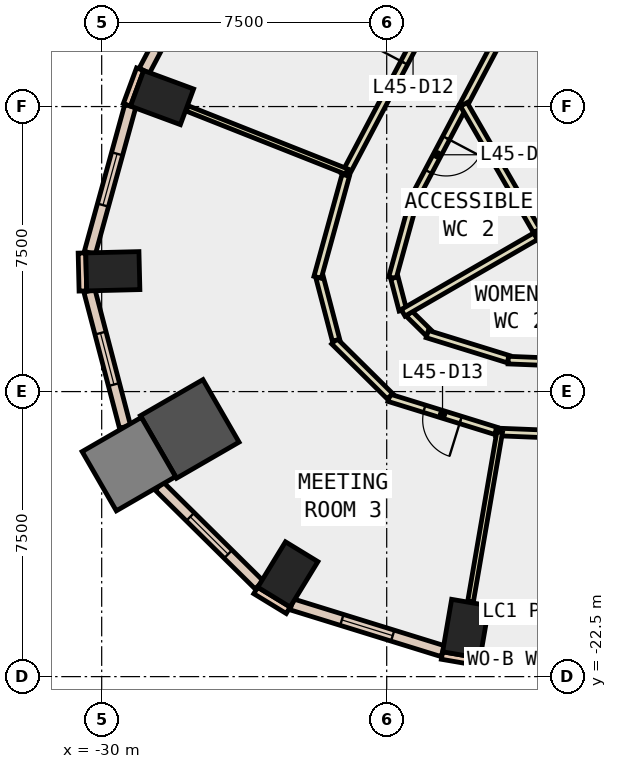
"""IFC4 building model, lengths in metres.
Left out: names, types, materials, properties, quantities, classifications, styles, units other than length and angle.
Written with IfcOpenShell. Run it as: python <this file> out.ifc"""

import sys

from ifc_helpers import new_model, si_unit, direction, frame, frame_2d, origin, origin_2d, place, context, subcontext, project, spatial, rectangle, extrude, element, fill, save


model = new_model("IFC4")
c1 = context("Model", 3, precision=1e-05, world=origin(), true_north=direction((0.0, 1.0)))
c2 = subcontext(c1, "Body", "Model", "MODEL_VIEW")
j1 = project(units=[si_unit("LENGTHUNIT", "METRE"), si_unit("PLANEANGLEUNIT", "RADIAN")], contexts=[c1])
p1 = place(None, origin())
s1 = spatial("IfcSite", under=j1, at=p1, CompositionType="ELEMENT")
p2 = place(p1, origin())
s2 = spatial("IfcBuilding", under=s1, at=p2, CompositionType="ELEMENT")
p3 = place(p2, frame((0.0, 0.0, 202.4)))
s3 = spatial("IfcBuildingStorey", under=s2, at=p3, CompositionType="ELEMENT", Elevation=202.4)
for number, where, z_axis, x_axis in (
    (1, (-20.417, -21.241, -0.4), (0.0, 0.0, 1.0), (-0.986, 0.169, 0.0)),
    (2, (-28.412, -7.264, -0.4), (0.0, 0.0, 1.0), (0.347, 0.938, 0.0)),
    (3, (-29.707, -11.834, -0.4), (0.0, 0.0, 1.0), (-0.025, 1.0, 0.0)),
):
    element("IfcColumn", number, at=place(p3, frame(where, z_axis=z_axis, x_axis=x_axis)), inside=s3, PredefinedType="COLUMN", context=c2, shape_type="SweptSolid", body=[
        extrude(rectangle(XDim=1.0, YDim=1.4, at=origin_2d()), origin(), (0.0, 0.0, 1.0), 4.2),
    ])
p4 = place(p3, frame((-27.683, -15.983, -0.4), z_axis=(0.0, 0.0, 1.0), x_axis=(0.866025403784, 0.5, 0.0)))
e4 = element("IfcColumn", 4, at=p4, inside=s3, PredefinedType="COLUMN", context=c2, shape_type="SweptSolid", body=[
    extrude(rectangle(XDim=1.9, YDim=1.9, at=origin_2d()), origin(), (0.0, 0.0, 1.0), 4.2),
])
p5 = place(p3, frame((-25.102, -19.811, -0.4), z_axis=(0.0, 0.0, 1.0), x_axis=(-0.853423465127, 0.521218178089, 0.0)))
e5 = element("IfcColumn", 5, at=p5, inside=s3, PredefinedType="COLUMN", context=c2, shape_type="SweptSolid", body=[
    extrude(rectangle(XDim=1.0, YDim=1.4, at=origin_2d()), origin(), (0.0, 0.0, 1.0), 4.2),
])
p6 = place(p3, frame((-29.285, -16.908, -0.4), z_axis=(0.0, 0.0, 1.0), x_axis=(0.866025403784, 0.5, 0.0)))
e6 = element("IfcColumn", 6, at=p6, inside=s3, PredefinedType="COLUMN", context=c2, shape_type="SweptSolid", body=[
    extrude(rectangle(XDim=1.8, YDim=1.8, at=origin_2d()), origin(), (0.0, 0.0, 1.0), 4.2),
])
p7 = place(p3, frame((-28.989, -6.518, 0.0), z_axis=(0.0, 0.0, 1.0), x_axis=(-0.346892928577, -0.937904737222, 0.0)))
e7 = element("IfcWall", 7, at=p7, inside=s3, PredefinedType="STANDARD", context=c2, shape_type="SweptSolid", body=[
    extrude(rectangle(XDim=1.0, YDim=0.2, at=frame_2d((0.5, 0.0))), origin(), (0.0, 0.0, 1.0), 3.8),
])
p8 = place(p3, frame((-21.045, -21.945, 0.0), z_axis=(0.0, 0.0, 1.0), x_axis=(0.985631544579, -0.168909615862, 0.0)))
e8 = element("IfcWall", 8, at=p8, inside=s3, PredefinedType="STANDARD", context=c2, shape_type="SweptSolid", body=[
    extrude(rectangle(XDim=1.0, YDim=0.2, at=frame_2d((0.5, 0.0))), origin(), (0.0, 0.0, 1.0), 3.8),
])
p9 = place(p3, frame((-30.519, -11.354, 0.0), z_axis=(0.0, 0.0, 1.0), x_axis=(0.023942303888, -0.999713341956, 0.0)))
e9 = element("IfcWall", 9, at=p9, inside=s3, PredefinedType="STANDARD", context=c2, shape_type="SweptSolid", body=[
    extrude(rectangle(XDim=0.999, YDim=0.2, at=frame_2d((0.5, 0.0))), origin(), (0.0, 0.0, 1.0), 3.8),
])
p10 = place(p3, frame((-25.946, -20.233, 0.0), z_axis=(0.0, 0.0, 1.0), x_axis=(0.853679739553, -0.520798331677, 0.0)))
e10 = element("IfcWall", 10, at=p10, inside=s3, PredefinedType="STANDARD", context=c2, shape_type="SweptSolid", body=[
    extrude(rectangle(XDim=1.0, YDim=0.2, at=frame_2d((0.5, 0.0))), origin(), (0.0, 0.0, 1.0), 3.8),
])
p11 = place(p3, frame((-20.04, -21.999, 0.0), z_axis=(0.0, 0.0, 1.0), x_axis=(0.999205241612, -0.039860822062, 0.0)))
e11 = element("IfcWall", 11, at=p11, inside=s3, PredefinedType="STANDARD", context=c2, shape_type="SweptSolid", body=[
    extrude(rectangle(XDim=5.365, YDim=0.3, at=frame_2d((2.683, 0.0))), origin(), (0.0, 0.0, 1.0), 3.8),
])
p12 = place(p11, frame((0.641, 0.0, 0.9)))
e12 = element("IfcOpeningElement", 12, at=p12, cuts=e11, PredefinedType="OPENING", context=c2, shape_type="SweptSolid", body=[
    extrude(rectangle(XDim=1.4, YDim=2.6, at=frame_2d((0.7, 1.3))), frame((0.0, 0.16, 0.0), z_axis=(0.0, -1.0, 0.0), x_axis=(1.0, 0.0, 0.0)), (0.0, 0.0, 1.0), 0.32),
])
p13 = place(p11, frame((3.324, 0.0, 0.9)))
e13 = element("IfcOpeningElement", 13, at=p13, cuts=e11, PredefinedType="OPENING", context=c2, shape_type="SweptSolid", body=[
    extrude(rectangle(XDim=1.4, YDim=2.6, at=frame_2d((0.7, 1.3))), frame((0.0, 0.16, 0.0), z_axis=(0.0, -1.0, 0.0), x_axis=(1.0, 0.0, 0.0)), (0.0, 0.0, 1.0), 0.32),
])
p14 = place(p3, frame((-25.484, -0.127, 0.0), z_axis=(0.0, 0.0, 1.0), x_axis=(-0.466789249342, -0.884368586449, 0.0)))
e14 = element("IfcWall", 14, at=p14, inside=s3, PredefinedType="STANDARD", context=c2, shape_type="SweptSolid", body=[
    extrude(rectangle(XDim=7.273, YDim=0.3, at=frame_2d((3.637, 0.0))), origin(), (0.0, 0.0, 1.0), 3.8),
])
p15 = place(p14, frame((0.618, 0.0, 0.9)))
e15 = element("IfcOpeningElement", 15, at=p15, cuts=e14, PredefinedType="OPENING", context=c2, shape_type="SweptSolid", body=[
    extrude(rectangle(XDim=2.4, YDim=2.6, at=frame_2d((1.2, 1.3))), frame((0.0, 0.16, 0.0), z_axis=(0.0, -1.0, 0.0), x_axis=(1.0, 0.0, 0.0)), (0.0, 0.0, 1.0), 0.32),
])
p16 = place(p14, frame((4.255, 0.0, 0.9)))
e16 = element("IfcOpeningElement", 16, at=p16, cuts=e14, PredefinedType="OPENING", context=c2, shape_type="SweptSolid", body=[
    extrude(rectangle(XDim=2.4, YDim=2.6, at=frame_2d((1.2, 1.3))), frame((0.0, 0.16, 0.0), z_axis=(0.0, -1.0, 0.0), x_axis=(1.0, 0.0, 0.0)), (0.0, 0.0, 1.0), 0.32),
])
p17 = place(p3, frame((-29.248, -7.487, 0.0), z_axis=(0.0, 0.0, 1.0), x_axis=(-0.265534577923, -0.96410133696, 0.0)))
e17 = element("IfcWall", 17, at=p17, inside=s3, PredefinedType="STANDARD", context=c2, shape_type="SweptSolid", body=[
    extrude(rectangle(XDim=4.007, YDim=0.3, at=frame_2d((2.003, 0.0))), origin(), (0.0, 0.0, 1.0), 3.8),
])
p18 = place(p17, frame((1.303, 0.0, 0.9)))
e18 = element("IfcOpeningElement", 18, at=p18, cuts=e17, PredefinedType="OPENING", context=c2, shape_type="SweptSolid", body=[
    extrude(rectangle(XDim=1.4, YDim=2.6, at=frame_2d((0.7, 1.3))), frame((0.0, 0.16, 0.0), z_axis=(0.0, -1.0, 0.0), x_axis=(1.0, 0.0, 0.0)), (0.0, 0.0, 1.0), 0.32),
])
p19 = place(p3, frame((-30.323, -12.348, 0.0), z_axis=(0.0, 0.0, 1.0), x_axis=(0.253200635583, -0.96741378848, 0.0)))
e19 = element("IfcWall", 19, at=p19, inside=s3, PredefinedType="STANDARD", context=c2, shape_type="SweptSolid", body=[
    extrude(rectangle(XDim=3.701, YDim=0.3, at=frame_2d((1.85, 0.0))), origin(), (0.0, 0.0, 1.0), 3.8),
])
p20 = place(p19, frame((1.15, 0.0, 0.9)))
e20 = element("IfcOpeningElement", 20, at=p20, cuts=e19, PredefinedType="OPENING", context=c2, shape_type="SweptSolid", body=[
    extrude(rectangle(XDim=1.4, YDim=2.6, at=frame_2d((0.7, 1.3))), frame((0.0, 0.16, 0.0), z_axis=(0.0, -1.0, 0.0), x_axis=(1.0, 0.0, 0.0)), (0.0, 0.0, 1.0), 0.32),
])
p21 = place(p3, frame((-28.487, -17.486, 0.0), z_axis=(0.0, 0.0, 1.0), x_axis=(0.711316812334, -0.702871533419, 0.0)))
e21 = element("IfcWall", 21, at=p21, inside=s3, PredefinedType="STANDARD", context=c2, shape_type="SweptSolid", body=[
    extrude(rectangle(XDim=3.7, YDim=0.3, at=frame_2d((1.85, 0.0))), origin(), (0.0, 0.0, 1.0), 3.8),
])
p22 = place(p21, frame((1.15, 0.0, 0.9)))
e22 = element("IfcOpeningElement", 22, at=p22, cuts=e21, PredefinedType="OPENING", context=c2, shape_type="SweptSolid", body=[
    extrude(rectangle(XDim=1.4, YDim=2.6, at=frame_2d((0.7, 1.3))), frame((0.0, 0.16, 0.0), z_axis=(0.0, -1.0, 0.0), x_axis=(1.0, 0.0, 0.0)), (0.0, 0.0, 1.0), 0.32),
])
p23 = place(p3, frame((-24.999, -20.599, 0.0), z_axis=(0.0, 0.0, 1.0), x_axis=(0.955247215067, -0.295808651171, 0.0)))
e23 = element("IfcWall", 23, at=p23, inside=s3, PredefinedType="STANDARD", context=c2, shape_type="SweptSolid", body=[
    extrude(rectangle(XDim=4.161, YDim=0.3, at=frame_2d((2.081, 0.0))), origin(), (0.0, 0.0, 1.0), 3.8),
])
p24 = place(p23, frame((1.381, 0.0, 0.9)))
e24 = element("IfcOpeningElement", 24, at=p24, cuts=e23, PredefinedType="OPENING", context=c2, shape_type="SweptSolid", body=[
    extrude(rectangle(XDim=1.4, YDim=2.6, at=frame_2d((0.7, 1.3))), frame((0.0, 0.16, 0.0), z_axis=(0.0, -1.0, 0.0), x_axis=(1.0, 0.0, 0.0)), (0.0, 0.0, 1.0), 0.32),
])
p25 = place(p3, frame((-18.344, -3.417, 0.0), z_axis=(0.0, 0.0, 1.0), x_axis=(-0.466889669343, -0.884315575267, 0.0)))
e25 = element("IfcWall", 25, at=p25, inside=s3, PredefinedType="PARTITIONING", context=c2, shape_type="SweptSolid", body=[
    extrude(rectangle(XDim=4.654, YDim=0.2, at=frame_2d((2.327, 0.0))), origin(), (0.0, 0.0, 1.0), 3.8),
])
p26 = place(p25, frame((1.827, 0.0, 0.0)))
e26 = element("IfcOpeningElement", 26, at=p26, cuts=e25, PredefinedType="OPENING", context=c2, shape_type="SweptSolid", body=[
    extrude(rectangle(XDim=1.0, YDim=2.1, at=frame_2d((0.5, 1.05))), frame((0.0, 0.11, 0.0), z_axis=(0.0, -1.0, 0.0), x_axis=(1.0, 0.0, 0.0)), (0.0, 0.0, 1.0), 0.22),
])
p27 = place(p3, frame((-20.517, -7.533, 0.0), z_axis=(0.0, 0.0, 1.0), x_axis=(-0.466570716246, -0.88448389852, 0.0)))
e27 = element("IfcWall", 27, at=p27, inside=s3, PredefinedType="PARTITIONING", context=c2, shape_type="SweptSolid", body=[
    extrude(rectangle(XDim=2.795, YDim=0.2, at=frame_2d((1.397, 0.0))), origin(), (0.0, 0.0, 1.0), 3.8),
])
p28 = place(p27, frame((0.897, 0.0, 0.0)))
e28 = element("IfcOpeningElement", 28, at=p28, cuts=e27, PredefinedType="OPENING", context=c2, shape_type="SweptSolid", body=[
    extrude(rectangle(XDim=1.0, YDim=2.1, at=frame_2d((0.5, 1.05))), frame((0.0, 0.11, 0.0), z_axis=(0.0, -1.0, 0.0), x_axis=(1.0, 0.0, 0.0)), (0.0, 0.0, 1.0), 0.22),
])
p29 = place(p3, frame((-21.801, -10.013, 0.0), z_axis=(0.0, 0.0, 1.0), x_axis=(-0.265584627827, -0.964087550725, 0.0)))
e29 = element("IfcWall", 29, at=p29, inside=s3, PredefinedType="PARTITIONING", context=c2, shape_type="SweptSolid", body=[
    extrude(rectangle(XDim=2.067, YDim=0.2, at=frame_2d((1.034, 0.0))), origin(), (0.0, 0.0, 1.0), 3.8),
])
p30 = place(p3, frame((-22.298, -12.006, 0.0), z_axis=(0.0, 0.0, 1.0), x_axis=(0.252647929446, -0.967558279251, 0.0)))
e30 = element("IfcWall", 30, at=p30, inside=s3, PredefinedType="PARTITIONING", context=c2, shape_type="SweptSolid", body=[
    extrude(rectangle(XDim=0.879, YDim=0.2, at=frame_2d((0.44, 0.0))), origin(), (0.0, 0.0, 1.0), 3.8),
])
p31 = place(p3, frame((-21.912, -12.948, 0.0), z_axis=(0.0, 0.0, 1.0), x_axis=(0.712089244685, -0.702088959893, 0.0)))
e31 = element("IfcWall", 31, at=p31, inside=s3, PredefinedType="PARTITIONING", context=c2, shape_type="SweptSolid", body=[
    extrude(rectangle(XDim=0.708, YDim=0.2, at=frame_2d((0.354, 0.0))), origin(), (0.0, 0.0, 1.0), 3.8),
])
p32 = place(p3, frame((-21.433, -13.486, 0.0), z_axis=(0.0, 0.0, 1.0), x_axis=(0.955241047187, -0.295828568211, 0.0)))
e32 = element("IfcWall", 32, at=p32, inside=s3, PredefinedType="PARTITIONING", context=c2, shape_type="SweptSolid", body=[
    extrude(rectangle(XDim=2.234, YDim=0.2, at=frame_2d((1.117, 0.0))), origin(), (0.0, 0.0, 1.0), 3.8),
])
p33 = place(p3, frame((-19.303, -14.172, 0.0), z_axis=(0.0, 0.0, 1.0), x_axis=(0.999205458466, -0.03985538574, 0.0)))
e33 = element("IfcWall", 33, at=p33, inside=s3, PredefinedType="PARTITIONING", context=c2, shape_type="SweptSolid", body=[
    extrude(rectangle(XDim=2.683, YDim=0.2, at=frame_2d((1.342, 0.0))), origin(), (0.0, 0.0, 1.0), 3.8),
])
p34 = place(p33, frame((0.842, 0.0, 0.0)))
e34 = element("IfcOpeningElement", 34, at=p34, cuts=e33, PredefinedType="OPENING", context=c2, shape_type="SweptSolid", body=[
    extrude(rectangle(XDim=1.0, YDim=2.1, at=frame_2d((0.5, 1.05))), frame((0.0, 0.11, 0.0), z_axis=(0.0, -1.0, 0.0), x_axis=(1.0, 0.0, 0.0)), (0.0, 0.0, 1.0), 0.22),
])
p35 = place(p3, frame((-23.598, -9.301, 0.0), z_axis=(0.0, 0.0, 1.0), x_axis=(0.466852608943, 0.884335140952, 0.0)))
e35 = element("IfcWall", 35, at=p35, inside=s3, PredefinedType="PARTITIONING", context=c2, shape_type="SweptSolid", body=[
    extrude(rectangle(XDim=7.675, YDim=0.2, at=frame_2d((3.837, 0.0))), origin(), (0.0, 0.0, 1.0), 3.8),
])
p36 = place(p35, frame((3.337, 0.0, 0.0)))
e36 = element("IfcOpeningElement", 36, at=p36, cuts=e35, PredefinedType="OPENING", context=c2, shape_type="SweptSolid", body=[
    extrude(rectangle(XDim=1.0, YDim=2.1, at=frame_2d((0.5, 1.05))), frame((0.0, 0.11, 0.0), z_axis=(0.0, -1.0, 0.0), x_axis=(1.0, 0.0, 0.0)), (0.0, 0.0, 1.0), 0.22),
])
p37 = place(p3, frame((-19.623, -16.035, 0.0), z_axis=(0.0, 0.0, 1.0), x_axis=(-0.955234616163, 0.295849333419, 0.0)))
e37 = element("IfcWall", 37, at=p37, inside=s3, PredefinedType="PARTITIONING", context=c2, shape_type="SweptSolid", body=[
    extrude(rectangle(XDim=2.947, YDim=0.2, at=frame_2d((1.473, 0.0))), origin(), (0.0, 0.0, 1.0), 3.8),
])
p38 = place(p37, frame((0.974, 0.0, 0.0)))
e38 = element("IfcOpeningElement", 38, at=p38, cuts=e37, PredefinedType="OPENING", context=c2, shape_type="SweptSolid", body=[
    extrude(rectangle(XDim=1.0, YDim=2.1, at=frame_2d((0.5, 1.05))), frame((0.0, 0.11, 0.0), z_axis=(0.0, -1.0, 0.0), x_axis=(1.0, 0.0, 0.0)), (0.0, 0.0, 1.0), 0.22),
])
p39 = place(p3, frame((-22.414, -15.123, 0.0), z_axis=(0.0, 0.0, 1.0), x_axis=(-0.710949827962, 0.703242733429, 0.0)))
e39 = element("IfcWall", 39, at=p39, inside=s3, PredefinedType="PARTITIONING", context=c2, shape_type="SweptSolid", body=[
    extrude(rectangle(XDim=2.059, YDim=0.2, at=frame_2d((1.03, 0.0))), origin(), (0.0, 0.0, 1.0), 3.8),
])
p40 = place(p3, frame((-23.833, -13.649, 0.0), z_axis=(0.0, 0.0, 1.0), x_axis=(-0.253025690571, 0.967459559832, 0.0)))
e40 = element("IfcWall", 40, at=p40, inside=s3, PredefinedType="PARTITIONING", context=c2, shape_type="SweptSolid", body=[
    extrude(rectangle(XDim=1.712, YDim=0.2, at=frame_2d((0.856, 0.0))), origin(), (0.0, 0.0, 1.0), 3.8),
])
p41 = place(p3, frame((-24.318, -11.993, 0.0), z_axis=(0.0, 0.0, 1.0), x_axis=(0.265884037198, 0.964005020092, 0.0)))
e41 = element("IfcWall", 41, at=p41, inside=s3, PredefinedType="PARTITIONING", context=c2, shape_type="SweptSolid", body=[
    extrude(rectangle(XDim=2.784, YDim=0.2, at=frame_2d((1.392, 0.0))), origin(), (0.0, 0.0, 1.0), 3.8),
])
p42 = place(p3, frame((-13.986, -16.286, 0.0), z_axis=(0.0, 0.0, 1.0), x_axis=(-0.999206475857, 0.039829870775, 0.0)))
e42 = element("IfcWall", 42, at=p42, inside=s3, PredefinedType="PARTITIONING", context=c2, shape_type="SweptSolid", body=[
    extrude(rectangle(XDim=5.645, YDim=0.2, at=frame_2d((2.823, 0.0))), origin(), (0.0, 0.0, 1.0), 3.8),
])
p43 = place(p42, frame((2.323, 0.0, 0.0)))
e43 = element("IfcOpeningElement", 43, at=p43, cuts=e42, PredefinedType="OPENING", context=c2, shape_type="SweptSolid", body=[
    extrude(rectangle(XDim=1.0, YDim=2.1, at=frame_2d((0.5, 1.05))), frame((0.0, 0.11, 0.0), z_axis=(0.0, -1.0, 0.0), x_axis=(1.0, 0.0, 0.0)), (0.0, 0.0, 1.0), 0.22),
])
p44 = place(p3, frame((-16.595, -9.757, 0.0), z_axis=(0.0, 0.0, 1.0), x_axis=(-0.866053019151, -0.499952165731, 0.0)))
e44 = element("IfcWall", 44, at=p44, inside=s3, PredefinedType="PARTITIONING", context=c2, shape_type="SweptSolid", body=[
    extrude(rectangle(XDim=2.3, YDim=0.2, at=frame_2d((1.15, 0.0))), origin(), (0.0, 0.0, 1.0), 3.8),
])
p45 = place(p3, frame((-18.55, -10.77, 0.0), z_axis=(0.0, 0.0, 1.0), x_axis=(-0.500050869834, 0.86599603208, 0.0)))
e45 = element("IfcWall", 45, at=p45, inside=s3, PredefinedType="PARTITIONING", context=c2, shape_type="SweptSolid", body=[
    extrude(rectangle(XDim=3.839, YDim=0.2, at=frame_2d((1.92, 0.0))), origin(), (0.0, 0.0, 1.0), 3.8),
])
p46 = place(p3, frame((-16.472, -14.37, 0.0), z_axis=(0.0, 0.0, 1.0), x_axis=(-0.500009715097, 0.866019794698, 0.0)))
e46 = element("IfcWall", 46, at=p46, inside=s3, PredefinedType="PARTITIONING", context=c2, shape_type="SweptSolid", body=[
    extrude(rectangle(XDim=3.948, YDim=0.2, at=frame_2d((1.974, 0.0))), origin(), (0.0, 0.0, 1.0), 3.8),
])
p47 = place(p3, frame((-18.583, -10.914, 0.0), z_axis=(0.0, 0.0, 1.0), x_axis=(-0.8659987338, -0.500046190923, 0.0)))
e47 = element("IfcWall", 47, at=p47, inside=s3, PredefinedType="PARTITIONING", context=c2, shape_type="SweptSolid", body=[
    extrude(rectangle(XDim=4.025, YDim=0.2, at=frame_2d((2.013, 0.0))), origin(), (0.0, 0.0, 1.0), 3.8),
])
p48 = place(p3, frame((-23.552, -9.212, 0.0), z_axis=(0.0, 0.0, 1.0), x_axis=(-0.929720624715, 0.368265610639, 0.0)))
e48 = element("IfcWall", 48, at=p48, inside=s3, PredefinedType="PARTITIONING", context=c2, shape_type="SweptSolid", body=[
    extrude(rectangle(XDim=4.515, YDim=0.15, at=frame_2d((2.258, 0.0))), origin(), (0.0, 0.0, 1.0), 3.8),
])
p49 = place(p3, frame((-19.527, -16.065, 0.0), z_axis=(0.0, 0.0, 1.0), x_axis=(-0.169437821314, -0.985540879268, 0.0)))
e49 = element("IfcWall", 49, at=p49, inside=s3, PredefinedType="PARTITIONING", context=c2, shape_type="SweptSolid", body=[
    extrude(rectangle(XDim=4.531, YDim=0.15, at=frame_2d((2.266, 0.0))), origin(), (0.0, 0.0, 1.0), 3.8),
])
p50 = place(p12, origin())
e50 = element("IfcWindow", 50, at=p50, inside=s3, PartitioningType="SINGLE_PANEL", PredefinedType="WINDOW", context=c2, shape_type="SweptSolid", body=[
    extrude(rectangle(XDim=1.4, YDim=2.6, at=frame_2d((0.7, 1.3))), frame((0.0, 0.03, 0.0), z_axis=(0.0, -1.0, 0.0), x_axis=(1.0, 0.0, 0.0)), (0.0, 0.0, 1.0), 0.06),
])
fill(e12, e50)
p51 = place(p18, origin())
e51 = element("IfcWindow", 51, at=p51, inside=s3, PartitioningType="SINGLE_PANEL", PredefinedType="WINDOW", context=c2, shape_type="SweptSolid", body=[
    extrude(rectangle(XDim=1.4, YDim=2.6, at=frame_2d((0.7, 1.3))), frame((0.0, 0.03, 0.0), z_axis=(0.0, -1.0, 0.0), x_axis=(1.0, 0.0, 0.0)), (0.0, 0.0, 1.0), 0.06),
])
fill(e18, e51)
p52 = place(p20, origin())
e52 = element("IfcWindow", 52, at=p52, inside=s3, PartitioningType="SINGLE_PANEL", PredefinedType="WINDOW", context=c2, shape_type="SweptSolid", body=[
    extrude(rectangle(XDim=1.4, YDim=2.6, at=frame_2d((0.7, 1.3))), frame((0.0, 0.03, 0.0), z_axis=(0.0, -1.0, 0.0), x_axis=(1.0, 0.0, 0.0)), (0.0, 0.0, 1.0), 0.06),
])
fill(e20, e52)
p53 = place(p22, origin())
e53 = element("IfcWindow", 53, at=p53, inside=s3, PartitioningType="SINGLE_PANEL", PredefinedType="WINDOW", context=c2, shape_type="SweptSolid", body=[
    extrude(rectangle(XDim=1.4, YDim=2.6, at=frame_2d((0.7, 1.3))), frame((0.0, 0.03, 0.0), z_axis=(0.0, -1.0, 0.0), x_axis=(1.0, 0.0, 0.0)), (0.0, 0.0, 1.0), 0.06),
])
fill(e22, e53)
p54 = place(p24, origin())
e54 = element("IfcWindow", 54, at=p54, inside=s3, PartitioningType="SINGLE_PANEL", PredefinedType="WINDOW", context=c2, shape_type="SweptSolid", body=[
    extrude(rectangle(XDim=1.4, YDim=2.6, at=frame_2d((0.7, 1.3))), frame((0.0, 0.03, 0.0), z_axis=(0.0, -1.0, 0.0), x_axis=(1.0, 0.0, 0.0)), (0.0, 0.0, 1.0), 0.06),
])
fill(e24, e54)
p55 = place(p36, origin())
e55 = element("IfcDoor", 55, at=p55, inside=s3, OperationType="SINGLE_SWING_LEFT", PredefinedType="DOOR", context=c2, shape_type="SweptSolid", body=[
    extrude(rectangle(XDim=1.0, YDim=2.1, at=frame_2d((0.5, 1.05))), frame((0.0, 0.025, 0.0), z_axis=(0.0, -1.0, 0.0), x_axis=(1.0, 0.0, 0.0)), (0.0, 0.0, 1.0), 0.05),
])
fill(e36, e55)
p56 = place(p38, origin())
e56 = element("IfcDoor", 56, at=p56, inside=s3, OperationType="SINGLE_SWING_LEFT", PredefinedType="DOOR", context=c2, shape_type="SweptSolid", body=[
    extrude(rectangle(XDim=1.0, YDim=2.1, at=frame_2d((0.5, 1.05))), frame((0.0, 0.025, 0.0), z_axis=(0.0, -1.0, 0.0), x_axis=(1.0, 0.0, 0.0)), (0.0, 0.0, 1.0), 0.05),
])
fill(e38, e56)
p57 = place(p28, origin())
e57 = element("IfcDoor", 57, at=p57, inside=s3, OperationType="SINGLE_SWING_LEFT", PredefinedType="DOOR", context=c2, shape_type="SweptSolid", body=[
    extrude(rectangle(XDim=1.0, YDim=2.1, at=frame_2d((0.5, 1.05))), frame((0.0, 0.025, 0.0), z_axis=(0.0, -1.0, 0.0), x_axis=(1.0, 0.0, 0.0)), (0.0, 0.0, 1.0), 0.05),
])
fill(e28, e57)
save(model, sys.argv[1])
